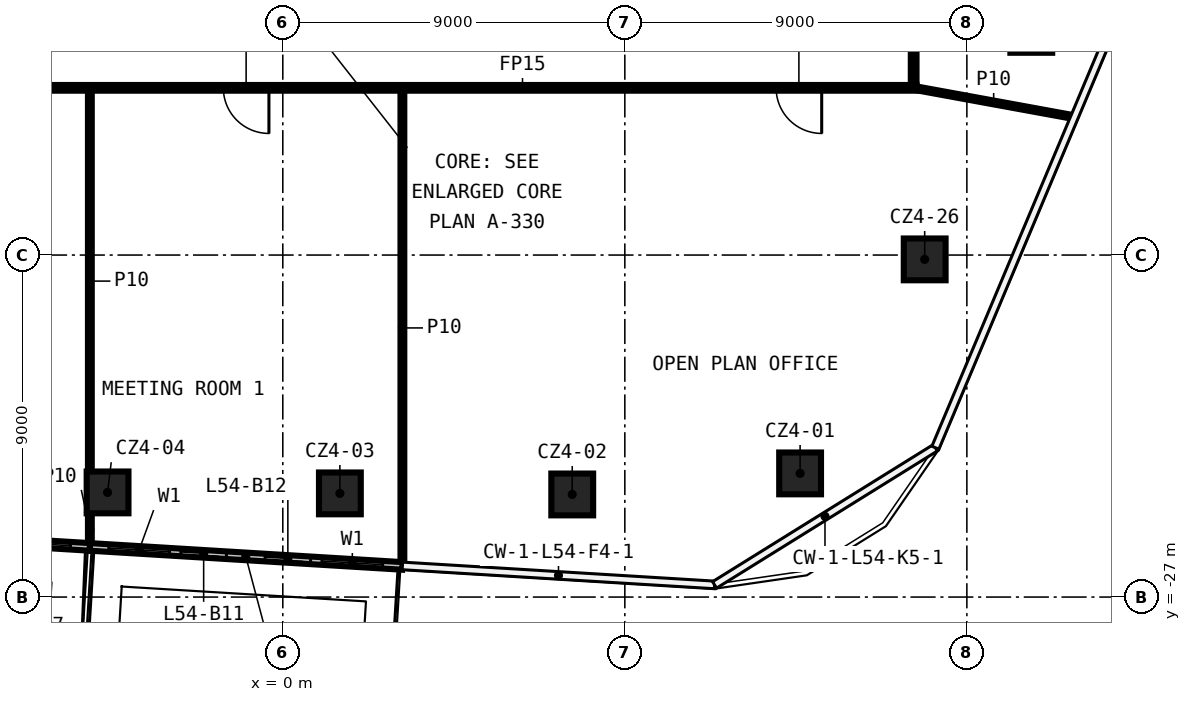
"""IFC4 building model, lengths in metres.
Left out: names, types, materials, properties, quantities, classifications, styles, units other than length and angle.
Written with IfcOpenShell. Run it as: python <this file> out.ifc"""

import sys

from ifc_helpers import new_model, si_unit, direction, frame, frame_2d, origin, origin_2d, place, context, subcontext, project, spatial, rectangle, extrude, element, fill, save


model = new_model("IFC4")
c1 = context("Model", 3, precision=1e-05, world=origin(), true_north=direction((0.0, 1.0)))
c2 = subcontext(c1, "Body", "Model", "MODEL_VIEW")
j1 = project(units=[si_unit("LENGTHUNIT", "METRE"), si_unit("PLANEANGLEUNIT", "RADIAN")], contexts=[c1])
p1 = place(None, origin())
s1 = spatial("IfcSite", under=j1, at=p1, CompositionType="ELEMENT")
p2 = place(p1, origin())
s2 = spatial("IfcBuilding", under=s1, at=p2, CompositionType="ELEMENT")
p3 = place(p2, frame((0.0, 0.0, 258.0)))
s3 = spatial("IfcBuildingStorey", under=s2, at=p3, CompositionType="ELEMENT", Elevation=258.0)
for number, where, z_axis, x_axis in (
    (1, (13.612, -23.746, 0.0), (0.0, 0.0, 1.0), (1.0, 0.0, 0.0)),
    (2, (7.616, -24.3, 0.0), (0.0, 0.0, 1.0), (1.0, 0.0, 0.0)),
    (3, (1.502, -24.272, 0.0), (0.0, 0.0, 1.0), (1.0, 0.0, 0.0)),
    (4, (-4.611, -24.246, 0.0), (0.0, 0.0, 1.0), (1.0, 0.0, 0.0)),
    (5, (19.695, -12.127, 0.0), (0.0, 0.0, 1.0), (1.0, 0.0, 0.0)),
    (6, (16.89, -18.114, 0.0), (0.0, 0.0, 1.0), (1.0, 0.0, 0.0)),
):
    element("IfcColumn", number, at=place(p3, frame(where, z_axis=z_axis, x_axis=x_axis)), inside=s3, PredefinedType="COLUMN", context=c2, shape_type="SweptSolid", body=[
        extrude(rectangle(XDim=1.1, YDim=1.1, at=origin_2d()), origin(), (0.0, 0.0, 1.0), 3.82),
    ])
p4 = place(p3, frame((16.675, -13.6, 0.0), z_axis=(0.0, 0.0, 1.0), x_axis=(-1.0, 0.0, 0.0)))
e7 = element("IfcWall", 7, at=p4, inside=s3, PredefinedType="PARTITIONING", context=c2, shape_type="SweptSolid", body=[
    extrude(rectangle(XDim=32.75, YDim=0.15, at=frame_2d((16.375, 0.0))), origin(), (0.0, 0.0, 1.0), 3.82),
])
p5 = place(p4, frame((29.587, 0.0, 0.0)))
e8 = element("IfcOpeningElement", 8, at=p5, cuts=e7, PredefinedType="OPENING", context=c2, shape_type="SweptSolid", body=[
    extrude(rectangle(XDim=1.2, YDim=2.1, at=frame_2d((0.6, 1.05))), frame((0.0, 0.085, 0.0), z_axis=(0.0, -1.0, 0.0), x_axis=(1.0, 0.0, 0.0)), (0.0, 0.0, 1.0), 0.17),
])
p6 = place(p4, frame((17.04, 0.0, 0.0)))
e9 = element("IfcOpeningElement", 9, at=p6, cuts=e7, PredefinedType="OPENING", context=c2, shape_type="SweptSolid", body=[
    extrude(rectangle(XDim=1.2, YDim=2.1, at=frame_2d((0.6, 1.05))), frame((0.0, 0.085, 0.0), z_axis=(0.0, -1.0, 0.0), x_axis=(1.0, 0.0, 0.0)), (0.0, 0.0, 1.0), 0.17),
])
p7 = place(p4, frame((2.495, 0.0, 0.0)))
e10 = element("IfcOpeningElement", 10, at=p7, cuts=e7, PredefinedType="OPENING", context=c2, shape_type="SweptSolid", body=[
    extrude(rectangle(XDim=1.2, YDim=2.1, at=frame_2d((0.6, 1.05))), frame((0.0, 0.085, 0.0), z_axis=(0.0, -1.0, 0.0), x_axis=(1.0, 0.0, 0.0)), (0.0, 0.0, 1.0), 0.17),
])
p8 = place(p3, frame((16.6, 13.525, 0.0), z_axis=(0.0, 0.0, 1.0), x_axis=(0.0, -1.0, 0.0)))
e11 = element("IfcWall", 11, at=p8, inside=s3, PredefinedType="PARTITIONING", context=c2, shape_type="SweptSolid", body=[
    extrude(rectangle(XDim=27.05, YDim=0.15, at=frame_2d((13.525, 0.0))), origin(), (0.0, 0.0, 1.0), 3.82),
])
p9 = place(p8, frame((22.559, 0.0, 0.0)))
e12 = element("IfcOpeningElement", 12, at=p9, cuts=e11, PredefinedType="OPENING", context=c2, shape_type="SweptSolid", body=[
    extrude(rectangle(XDim=1.2, YDim=2.1, at=frame_2d((0.6, 1.05))), frame((0.0, 0.085, 0.0), z_axis=(0.0, -1.0, 0.0), x_axis=(1.0, 0.0, 0.0)), (0.0, 0.0, 1.0), 0.17),
])
p10 = place(p8, frame((11.036, 0.0, 0.0)))
e13 = element("IfcOpeningElement", 13, at=p10, cuts=e11, PredefinedType="OPENING", context=c2, shape_type="SweptSolid", body=[
    extrude(rectangle(XDim=1.2, YDim=2.1, at=frame_2d((0.6, 1.05))), frame((0.0, 0.085, 0.0), z_axis=(0.0, -1.0, 0.0), x_axis=(1.0, 0.0, 0.0)), (0.0, 0.0, 1.0), 0.17),
])
p11 = place(p3, frame((3.147, -26.161, 0.0), z_axis=(0.0, 0.0, 1.0), x_axis=(0.0, 1.0, 0.0)))
e14 = element("IfcWall", 14, at=p11, inside=s3, PredefinedType="PARTITIONING", context=c2, shape_type="SweptSolid", body=[
    extrude(rectangle(XDim=12.486, YDim=0.1, at=frame_2d((6.243, 0.0))), origin(), (0.0, 0.0, 1.0), 3.82),
])
p12 = place(p3, frame((-5.077, -25.66, 0.0), z_axis=(0.0, 0.0, 1.0), x_axis=(0.0, 1.0, 0.0)))
e15 = element("IfcWall", 15, at=p12, inside=s3, PredefinedType="PARTITIONING", context=c2, shape_type="SweptSolid", body=[
    extrude(rectangle(XDim=0.864, YDim=0.1, at=frame_2d((0.432, 0.0))), origin(), (0.0, 0.0, 1.0), 3.82),
])
p13 = place(p3, frame((-5.077, -23.696, 0.0), z_axis=(0.0, 0.0, 1.0), x_axis=(0.0, 1.0, 0.0)))
e16 = element("IfcWall", 16, at=p13, inside=s3, PredefinedType="PARTITIONING", context=c2, shape_type="SweptSolid", body=[
    extrude(rectangle(XDim=10.021, YDim=0.1, at=frame_2d((5.01, 0.0))), origin(), (0.0, 0.0, 1.0), 3.82),
])
p14 = place(p3, frame((16.6, -13.6, 0.0), z_axis=(0.0, 0.0, 1.0), x_axis=(0.983699688502, -0.179819139254, 0.0)))
e17 = element("IfcWall", 17, at=p14, inside=s3, PredefinedType="PARTITIONING", context=c2, shape_type="SweptSolid", body=[
    extrude(rectangle(XDim=4.28, YDim=0.1, at=frame_2d((2.14, 0.0))), origin(), (0.0, 0.0, 1.0), 3.82),
])
p15 = place(p3, frame((-5.077, -25.68, 0.0), z_axis=(0.0, 0.0, 1.0), x_axis=(0.998153501879, -0.060741968084, 0.0)))
e18 = element("IfcWall", 18, at=p15, inside=s3, PredefinedType="SOLIDWALL", context=c2, shape_type="SweptSolid", body=[
    extrude(rectangle(XDim=8.24, YDim=0.2, at=frame_2d((4.12, 0.0))), origin(), (0.0, 0.0, 1.0), 3.82),
])
p16 = place(p15, frame((0.5, 0.0, 0.6)))
e19 = element("IfcOpeningElement", 19, at=p16, cuts=e18, PredefinedType="OPENING", context=c2, shape_type="SweptSolid", body=[
    extrude(rectangle(XDim=1.6, YDim=2.4, at=frame_2d((0.8, 1.2))), frame((0.0, 0.11, 0.0), z_axis=(0.0, -1.0, 0.0), x_axis=(1.0, 0.0, 0.0)), (0.0, 0.0, 1.0), 0.22),
])
p17 = place(p15, frame((2.4, 0.0, 0.0)))
e20 = element("IfcOpeningElement", 20, at=p17, cuts=e18, PredefinedType="OPENING", context=c2, shape_type="SweptSolid", body=[
    extrude(rectangle(XDim=1.2, YDim=2.4, at=frame_2d((0.6, 1.2))), frame((0.0, 0.11, 0.0), z_axis=(0.0, -1.0, 0.0), x_axis=(1.0, 0.0, 0.0)), (0.0, 0.0, 1.0), 0.22),
])
p18 = place(p15, frame((6.12, 0.0, 0.6)))
e21 = element("IfcOpeningElement", 21, at=p18, cuts=e18, PredefinedType="OPENING", context=c2, shape_type="SweptSolid", body=[
    extrude(rectangle(XDim=1.6, YDim=2.4, at=frame_2d((0.8, 1.2))), frame((0.0, 0.11, 0.0), z_axis=(0.0, -1.0, 0.0), x_axis=(1.0, 0.0, 0.0)), (0.0, 0.0, 1.0), 0.22),
])
p19 = place(p15, frame((4.62, 0.0, 0.0)))
e22 = element("IfcOpeningElement", 22, at=p19, cuts=e18, PredefinedType="OPENING", context=c2, shape_type="SweptSolid", body=[
    extrude(rectangle(XDim=1.2, YDim=2.4, at=frame_2d((0.6, 1.2))), frame((0.0, 0.11, 0.0), z_axis=(0.0, -1.0, 0.0), x_axis=(1.0, 0.0, 0.0)), (0.0, 0.0, 1.0), 0.22),
])
p20 = place(p3, frame((-9.181, -25.43, 0.0), z_axis=(0.0, 0.0, 1.0), x_axis=(0.998152924564, -0.060751454178, 0.0)))
e23 = element("IfcWall", 23, at=p20, inside=s3, PredefinedType="SOLIDWALL", context=c2, shape_type="SweptSolid", body=[
    extrude(rectangle(XDim=4.111, YDim=0.2, at=frame_2d((2.056, 0.0))), origin(), (0.0, 0.0, 1.0), 3.82),
])
p21 = place(p20, frame((2.0, 0.0, 0.6)))
e24 = element("IfcOpeningElement", 24, at=p21, cuts=e23, PredefinedType="OPENING", context=c2, shape_type="SweptSolid", body=[
    extrude(rectangle(XDim=1.6, YDim=2.4, at=frame_2d((0.8, 1.2))), frame((0.0, 0.11, 0.0), z_axis=(0.0, -1.0, 0.0), x_axis=(1.0, 0.0, 0.0)), (0.0, 0.0, 1.0), 0.22),
])
p22 = place(p20, frame((0.5, 0.0, 0.0)))
e25 = element("IfcOpeningElement", 25, at=p22, cuts=e23, PredefinedType="OPENING", context=c2, shape_type="SweptSolid", body=[
    extrude(rectangle(XDim=1.2, YDim=2.4, at=frame_2d((0.6, 1.2))), frame((0.0, 0.11, 0.0), z_axis=(0.0, -1.0, 0.0), x_axis=(1.0, 0.0, 0.0)), (0.0, 0.0, 1.0), 0.22),
])
p23 = place(p6, origin())
e26 = element("IfcDoor", 26, at=p23, inside=s3, OperationType="SINGLE_SWING_LEFT", PredefinedType="DOOR", context=c2, shape_type="SweptSolid", body=[
    extrude(rectangle(XDim=1.2, YDim=2.1, at=frame_2d((0.6, 1.05))), frame((0.0, 0.025, 0.0), z_axis=(0.0, -1.0, 0.0), x_axis=(1.0, 0.0, 0.0)), (0.0, 0.0, 1.0), 0.05),
])
fill(e9, e26)
p24 = place(p7, origin())
e27 = element("IfcDoor", 27, at=p24, inside=s3, OperationType="SINGLE_SWING_RIGHT", PredefinedType="DOOR", context=c2, shape_type="SweptSolid", body=[
    extrude(rectangle(XDim=1.2, YDim=2.1, at=frame_2d((0.6, 1.05))), frame((0.0, 0.025, 0.0), z_axis=(0.0, -1.0, 0.0), x_axis=(1.0, 0.0, 0.0)), (0.0, 0.0, 1.0), 0.05),
])
fill(e10, e27)
p25 = place(p16, origin())
e28 = element("IfcWindow", 28, at=p25, inside=s3, PartitioningType="SINGLE_PANEL", PredefinedType="WINDOW", context=c2, shape_type="SweptSolid", body=[
    extrude(rectangle(XDim=1.6, YDim=2.4, at=frame_2d((0.8, 1.2))), frame((0.0, 0.03, 0.0), z_axis=(0.0, -1.0, 0.0), x_axis=(1.0, 0.0, 0.0)), (0.0, 0.0, 1.0), 0.06),
])
fill(e19, e28)
p26 = place(p17, origin())
e29 = element("IfcDoor", 29, at=p26, inside=s3, OperationType="SLIDING_TO_LEFT", PredefinedType="DOOR", context=c2, shape_type="SweptSolid", body=[
    extrude(rectangle(XDim=1.2, YDim=2.4, at=frame_2d((0.6, 1.2))), frame((0.0, 0.025, 0.0), z_axis=(0.0, -1.0, 0.0), x_axis=(1.0, 0.0, 0.0)), (0.0, 0.0, 1.0), 0.05),
])
fill(e20, e29)
p27 = place(p18, origin())
e30 = element("IfcWindow", 30, at=p27, inside=s3, PartitioningType="SINGLE_PANEL", PredefinedType="WINDOW", context=c2, shape_type="SweptSolid", body=[
    extrude(rectangle(XDim=1.6, YDim=2.4, at=frame_2d((0.8, 1.2))), frame((0.0, 0.03, 0.0), z_axis=(0.0, -1.0, 0.0), x_axis=(1.0, 0.0, 0.0)), (0.0, 0.0, 1.0), 0.06),
])
fill(e21, e30)
p28 = place(p19, origin())
e31 = element("IfcDoor", 31, at=p28, inside=s3, OperationType="SLIDING_TO_LEFT", PredefinedType="DOOR", context=c2, shape_type="SweptSolid", body=[
    extrude(rectangle(XDim=1.2, YDim=2.4, at=frame_2d((0.6, 1.2))), frame((0.0, 0.025, 0.0), z_axis=(0.0, -1.0, 0.0), x_axis=(1.0, 0.0, 0.0)), (0.0, 0.0, 1.0), 0.05),
])
fill(e22, e31)
p29 = place(p21, origin())
e32 = element("IfcWindow", 32, at=p29, inside=s3, PartitioningType="SINGLE_PANEL", PredefinedType="WINDOW", context=c2, shape_type="SweptSolid", body=[
    extrude(rectangle(XDim=1.6, YDim=2.4, at=frame_2d((0.8, 1.2))), frame((0.0, 0.03, 0.0), z_axis=(0.0, -1.0, 0.0), x_axis=(1.0, 0.0, 0.0)), (0.0, 0.0, 1.0), 0.06),
])
fill(e24, e32)
save(model, sys.argv[1])
